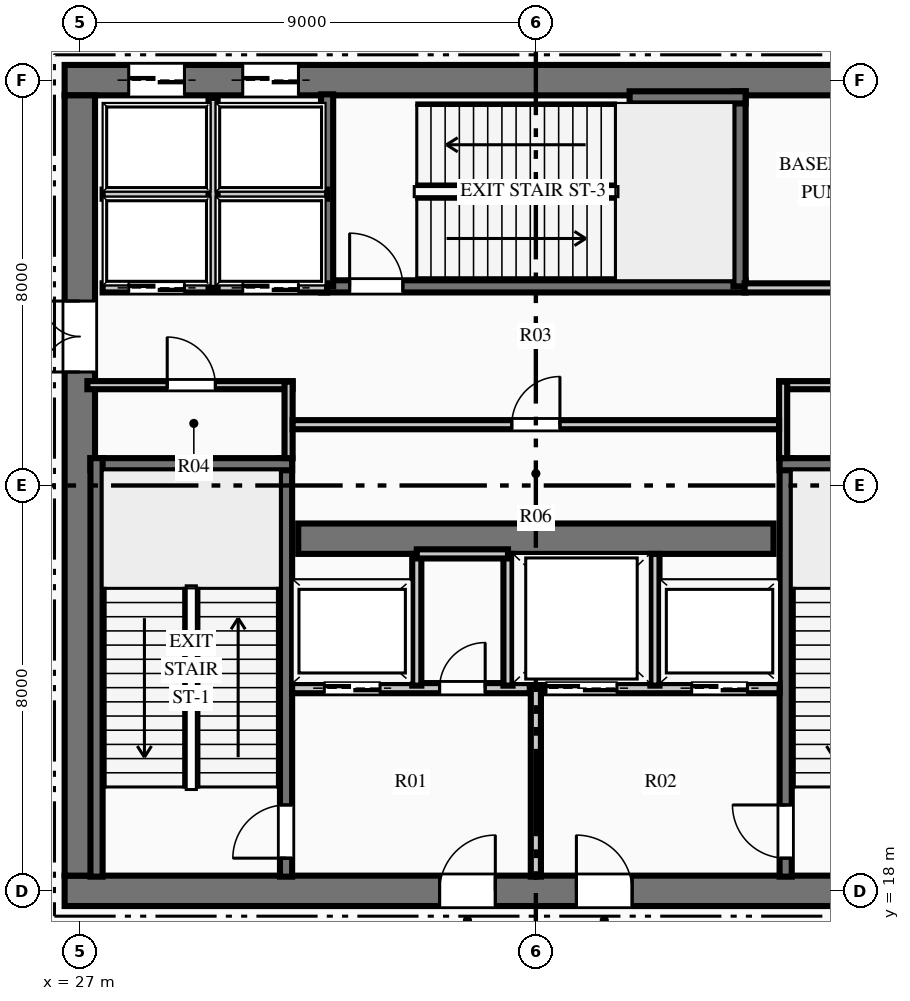
"""IFC4 building model, lengths in metres.
Left out: names, types, materials, properties, quantities, classifications, styles, units other than length and angle.
Written with IfcOpenShell. Run it as: python <this file> out.ifc"""

import sys

from ifc_helpers import new_model, si_unit, direction, frame, frame_2d, origin, place, context, subcontext, project, spatial, rectangle, extrude, element, fill, save


model = new_model("IFC4")
c1 = context("Model", 3, precision=1e-05, world=origin(), true_north=direction((0.0, 1.0)))
c2 = subcontext(c1, "Body", "Model", "MODEL_VIEW")
j1 = project(units=[si_unit("LENGTHUNIT", "METRE"), si_unit("PLANEANGLEUNIT", "RADIAN")], contexts=[c1])
p1 = place(None, origin())
s1 = spatial("IfcSite", under=j1, at=p1, CompositionType="ELEMENT")
p2 = place(p1, origin())
s2 = spatial("IfcBuilding", under=s1, at=p2, CompositionType="ELEMENT")
p3 = place(p2, frame((0.0, 0.0, -5.2)))
s3 = spatial("IfcBuildingStorey", under=s2, at=p3, CompositionType="ELEMENT", Elevation=-5.2)
p4 = place(p3, frame((26.7, 18.0, -0.3), z_axis=(0.0, 0.0, 1.0), x_axis=(1.0, 0.0, 0.0)))
e1 = element("IfcWall", 1, at=p4, inside=s3, PredefinedType="SHEAR", context=c2, shape_type="SweptSolid", body=[
    extrude(rectangle(XDim=18.6, YDim=0.6, at=frame_2d((9.3, 0.0))), origin(), (0.0, 0.0, 1.0), 5.5),
])
p5 = place(p4, frame((7.4, 0.0, 0.3)))
e2 = element("IfcOpeningElement", 2, at=p5, cuts=e1, PredefinedType="OPENING", context=c2, shape_type="SweptSolid", body=[
    extrude(rectangle(XDim=1.1, YDim=2.15, at=frame_2d((0.55, 1.075))), frame((0.0, 0.31, 0.0), z_axis=(0.0, -1.0, 0.0), x_axis=(1.0, 0.0, 0.0)), (0.0, 0.0, 1.0), 0.62),
])
p6 = place(p4, frame((10.1, 0.0, 0.3)))
e3 = element("IfcOpeningElement", 3, at=p6, cuts=e1, PredefinedType="OPENING", context=c2, shape_type="SweptSolid", body=[
    extrude(rectangle(XDim=1.1, YDim=2.15, at=frame_2d((0.55, 1.075))), frame((0.0, 0.31, 0.0), z_axis=(0.0, -1.0, 0.0), x_axis=(1.0, 0.0, 0.0)), (0.0, 0.0, 1.0), 0.62),
])
p7 = place(p3, frame((26.7, 34.0, -0.3), z_axis=(0.0, 0.0, 1.0), x_axis=(1.0, 0.0, 0.0)))
e4 = element("IfcWall", 4, at=p7, inside=s3, PredefinedType="SHEAR", context=c2, shape_type="SweptSolid", body=[
    extrude(rectangle(XDim=18.6, YDim=0.6, at=frame_2d((9.3, 0.0))), origin(), (0.0, 0.0, 1.0), 5.5),
])
p8 = place(p7, frame((1.265, 0.0, 0.3)))
e5 = element("IfcOpeningElement", 5, at=p8, cuts=e4, PredefinedType="OPENING", context=c2, shape_type="SweptSolid", body=[
    extrude(rectangle(XDim=1.1, YDim=2.15, at=frame_2d((0.55, 1.075))), frame((0.0, 0.31, 0.0), z_axis=(0.0, -1.0, 0.0), x_axis=(1.0, 0.0, 0.0)), (0.0, 0.0, 1.0), 0.62),
])
p9 = place(p7, frame((3.515, 0.0, 0.3)))
e6 = element("IfcOpeningElement", 6, at=p9, cuts=e4, PredefinedType="OPENING", context=c2, shape_type="SweptSolid", body=[
    extrude(rectangle(XDim=1.1, YDim=2.15, at=frame_2d((0.55, 1.075))), frame((0.0, 0.31, 0.0), z_axis=(0.0, -1.0, 0.0), x_axis=(1.0, 0.0, 0.0)), (0.0, 0.0, 1.0), 0.62),
])
p10 = place(p3, frame((27.0, 18.3, -0.3), z_axis=(0.0, 0.0, 1.0), x_axis=(0.0, 1.0, 0.0)))
e7 = element("IfcWall", 7, at=p10, inside=s3, PredefinedType="SHEAR", context=c2, shape_type="SweptSolid", body=[
    extrude(rectangle(XDim=15.4, YDim=0.6, at=frame_2d((7.7, 0.0))), origin(), (0.0, 0.0, 1.0), 5.5),
])
p11 = place(p10, frame((9.94, 0.0, 0.3)))
e8 = element("IfcOpeningElement", 8, at=p11, cuts=e7, PredefinedType="OPENING", context=c2, shape_type="SweptSolid", body=[
    extrude(rectangle(XDim=1.4, YDim=2.2, at=frame_2d((0.7, 1.1))), frame((0.0, 0.31, 0.0), z_axis=(0.0, -1.0, 0.0), x_axis=(1.0, 0.0, 0.0)), (0.0, 0.0, 1.0), 0.62),
])
p12 = place(p3, frame((31.31, 24.95, -0.3), z_axis=(0.0, 0.0, 1.0), x_axis=(1.0, 0.0, 0.0)))
e9 = element("IfcWall", 9, at=p12, inside=s3, PredefinedType="SHEAR", context=c2, shape_type="SweptSolid", body=[
    extrude(rectangle(XDim=9.38, YDim=0.6, at=frame_2d((4.69, 0.0))), origin(), (0.0, 0.0, 1.0), 5.5),
])
p13 = place(p3, frame((31.07, 18.28, -0.3), z_axis=(0.0, 0.0, 1.0), x_axis=(0.0, 1.0, 0.0)))
e10 = element("IfcWall", 10, at=p13, inside=s3, PredefinedType="SHEAR", context=c2, shape_type="SweptSolid", body=[
    extrude(rectangle(XDim=8.26, YDim=0.24, at=frame_2d((4.13, 0.0))), origin(), (0.0, 0.0, 1.0), 5.5),
])
p14 = place(p13, frame((0.365, 0.0, 0.3)))
e11 = element("IfcOpeningElement", 11, at=p14, cuts=e10, PredefinedType="OPENING", context=c2, shape_type="SweptSolid", body=[
    extrude(rectangle(XDim=1.05, YDim=2.15, at=frame_2d((0.525, 1.075))), frame((0.0, 0.13, 0.0), z_axis=(0.0, -1.0, 0.0), x_axis=(1.0, 0.0, 0.0)), (0.0, 0.0, 1.0), 0.26),
])
p15 = place(p3, frame((27.21, 26.42, -0.3), z_axis=(0.0, 0.0, 1.0), x_axis=(1.0, 0.0, 0.0)))
e12 = element("IfcWall", 12, at=p15, inside=s3, PredefinedType="SHEAR", context=c2, shape_type="SweptSolid", body=[
    extrude(rectangle(XDim=3.98, YDim=0.24, at=frame_2d((1.99, 0.0))), origin(), (0.0, 0.0, 1.0), 5.5),
])
p16 = place(p3, frame((27.33, 18.28, -0.3), z_axis=(0.0, 0.0, 1.0), x_axis=(0.0, 1.0, 0.0)))
e13 = element("IfcWall", 13, at=p16, inside=s3, PredefinedType="SHEAR", context=c2, shape_type="SweptSolid", body=[
    extrude(rectangle(XDim=8.26, YDim=0.24, at=frame_2d((4.13, 0.0))), origin(), (0.0, 0.0, 1.0), 5.5),
])
p17 = place(p3, frame((40.93, 18.28, -0.3), z_axis=(0.0, 0.0, 1.0), x_axis=(0.0, 1.0, 0.0)))
e14 = element("IfcWall", 14, at=p17, inside=s3, PredefinedType="SHEAR", context=c2, shape_type="SweptSolid", body=[
    extrude(rectangle(XDim=8.26, YDim=0.24, at=frame_2d((4.13, 0.0))), origin(), (0.0, 0.0, 1.0), 5.5),
])
p18 = place(p17, frame((0.365, 0.0, 0.3)))
e15 = element("IfcOpeningElement", 15, at=p18, cuts=e14, PredefinedType="OPENING", context=c2, shape_type="SweptSolid", body=[
    extrude(rectangle(XDim=1.05, YDim=2.15, at=frame_2d((0.525, 1.075))), frame((0.0, 0.13, 0.0), z_axis=(0.0, -1.0, 0.0), x_axis=(1.0, 0.0, 0.0)), (0.0, 0.0, 1.0), 0.26),
])
p19 = place(p3, frame((40.81, 26.42, -0.3), z_axis=(0.0, 0.0, 1.0), x_axis=(1.0, 0.0, 0.0)))
e16 = element("IfcWall", 16, at=p19, inside=s3, PredefinedType="SHEAR", context=c2, shape_type="SweptSolid", body=[
    extrude(rectangle(XDim=3.98, YDim=0.24, at=frame_2d((1.99, 0.0))), origin(), (0.0, 0.0, 1.0), 5.5),
])
p20 = place(p3, frame((31.76, 29.93, -0.3), z_axis=(0.0, 0.0, 1.0), x_axis=(1.0, 0.0, 0.0)))
e17 = element("IfcWall", 17, at=p20, inside=s3, PredefinedType="SHEAR", context=c2, shape_type="SweptSolid", body=[
    extrude(rectangle(XDim=8.38, YDim=0.24, at=frame_2d((4.19, 0.0))), origin(), (0.0, 0.0, 1.0), 5.5),
])
p21 = place(p20, frame((0.565, 0.0, 0.3)))
e18 = element("IfcOpeningElement", 18, at=p21, cuts=e17, PredefinedType="OPENING", context=c2, shape_type="SweptSolid", body=[
    extrude(rectangle(XDim=1.05, YDim=2.15, at=frame_2d((0.525, 1.075))), frame((0.0, 0.13, 0.0), z_axis=(0.0, -1.0, 0.0), x_axis=(1.0, 0.0, 0.0)), (0.0, 0.0, 1.0), 0.26),
])
p22 = place(p3, frame((31.88, 29.93, -0.3), z_axis=(0.0, 0.0, 1.0), x_axis=(0.0, 1.0, 0.0)))
e19 = element("IfcWall", 19, at=p22, inside=s3, PredefinedType="SHEAR", context=c2, shape_type="SweptSolid", body=[
    extrude(rectangle(XDim=3.79, YDim=0.24, at=frame_2d((1.895, 0.0))), origin(), (0.0, 0.0, 1.0), 5.5),
])
p23 = place(p3, frame((40.02, 29.93, -0.3), z_axis=(0.0, 0.0, 1.0), x_axis=(0.0, 1.0, 0.0)))
e20 = element("IfcWall", 20, at=p23, inside=s3, PredefinedType="SHEAR", context=c2, shape_type="SweptSolid", body=[
    extrude(rectangle(XDim=3.85, YDim=0.24, at=frame_2d((1.925, 0.0))), origin(), (0.0, 0.0, 1.0), 5.5),
])
p24 = place(p3, frame((37.85, 33.66, -0.3), z_axis=(0.0, 0.0, 1.0), x_axis=(1.0, 0.0, 0.0)))
e21 = element("IfcWall", 21, at=p24, inside=s3, PredefinedType="SHEAR", context=c2, shape_type="SweptSolid", body=[
    extrude(rectangle(XDim=2.29, YDim=0.24, at=frame_2d((1.145, 0.0))), origin(), (0.0, 0.0, 1.0), 5.5),
])
p25 = place(p3, frame((36.0, 18.28, 0.0), z_axis=(0.0, 0.0, 1.0), x_axis=(0.0, 1.0, 0.0)))
e22 = element("IfcWall", 22, at=p25, inside=s3, PredefinedType="PARTITIONING", context=c2, shape_type="SweptSolid", body=[
    extrude(rectangle(XDim=3.77, YDim=0.2, at=frame_2d((1.885, 0.0))), origin(), (0.0, 0.0, 1.0), 4.84),
])
p26 = place(p3, frame((31.19, 22.0, 0.0), z_axis=(0.0, 0.0, 1.0), x_axis=(1.0, 0.0, 0.0)))
e23 = element("IfcWall", 23, at=p26, inside=s3, PredefinedType="PARTITIONING", context=c2, shape_type="SweptSolid", body=[
    extrude(rectangle(XDim=4.69, YDim=0.2, at=frame_2d((2.345, 0.0))), origin(), (0.0, 0.0, 1.0), 4.84),
])
p27 = place(p26, frame((2.91, 0.0, 0.0)))
e24 = element("IfcOpeningElement", 24, at=p27, cuts=e23, PredefinedType="OPENING", context=c2, shape_type="SweptSolid", body=[
    extrude(rectangle(XDim=0.9, YDim=2.15, at=frame_2d((0.45, 1.075))), frame((0.0, 0.11, 0.0), z_axis=(0.0, -1.0, 0.0), x_axis=(1.0, 0.0, 0.0)), (0.0, 0.0, 1.0), 0.22),
])
p28 = place(p26, frame((0.635, 0.0, 0.0)))
e25 = element("IfcOpeningElement", 25, at=p28, cuts=e23, PredefinedType="OPENING", context=c2, shape_type="SweptSolid", body=[
    extrude(rectangle(XDim=1.1, YDim=2.15, at=frame_2d((0.55, 1.075))), frame((0.0, 0.11, 0.0), z_axis=(0.0, -1.0, 0.0), x_axis=(1.0, 0.0, 0.0)), (0.0, 0.0, 1.0), 0.22),
])
p29 = place(p3, frame((36.12, 22.0, 0.0), z_axis=(0.0, 0.0, 1.0), x_axis=(1.0, 0.0, 0.0)))
e26 = element("IfcWall", 26, at=p29, inside=s3, PredefinedType="PARTITIONING", context=c2, shape_type="SweptSolid", body=[
    extrude(rectangle(XDim=4.69, YDim=0.2, at=frame_2d((2.345, 0.0))), origin(), (0.0, 0.0, 1.0), 4.84),
])
p30 = place(p29, frame((2.955, 0.0, 0.0)))
e27 = element("IfcOpeningElement", 27, at=p30, cuts=e26, PredefinedType="OPENING", context=c2, shape_type="SweptSolid", body=[
    extrude(rectangle(XDim=1.1, YDim=2.15, at=frame_2d((0.55, 1.075))), frame((0.0, 0.11, 0.0), z_axis=(0.0, -1.0, 0.0), x_axis=(1.0, 0.0, 0.0)), (0.0, 0.0, 1.0), 0.22),
])
p31 = place(p29, frame((0.08, 0.0, 0.0)))
e28 = element("IfcOpeningElement", 28, at=p31, cuts=e26, PredefinedType="OPENING", context=c2, shape_type="SweptSolid", body=[
    extrude(rectangle(XDim=1.4, YDim=2.2, at=frame_2d((0.7, 1.1))), frame((0.0, 0.11, 0.0), z_axis=(0.0, -1.0, 0.0), x_axis=(1.0, 0.0, 0.0)), (0.0, 0.0, 1.0), 0.22),
])
for number, where, z_axis, x_axis in (
    (29, (33.65, 22.05, 0.0), (0.0, 0.0, 1.0), (0.0, 1.0, 0.0)),
    (30, (35.45, 22.05, 0.0), (0.0, 0.0, 1.0), (0.0, 1.0, 0.0)),
):
    element("IfcWall", number, at=place(p3, frame(where, z_axis=z_axis, x_axis=x_axis)), inside=s3, PredefinedType="PARTITIONING", context=c2, shape_type="SweptSolid", body=[
        extrude(rectangle(XDim=2.6, YDim=0.18, at=frame_2d((1.3, 0.0))), origin(), (0.0, 0.0, 1.0), 4.84),
    ])
p32 = place(p3, frame((33.65, 24.65, 0.0), z_axis=(0.0, 0.0, 1.0), x_axis=(1.0, 0.0, 0.0)))
e31 = element("IfcWall", 31, at=p32, inside=s3, PredefinedType="PARTITIONING", context=c2, shape_type="SweptSolid", body=[
    extrude(rectangle(XDim=1.8, YDim=0.18, at=frame_2d((0.9, 0.0))), origin(), (0.0, 0.0, 1.0), 4.84),
])
p33 = place(p3, frame((38.35, 22.05, 0.0), z_axis=(0.0, 0.0, 1.0), x_axis=(0.0, 1.0, 0.0)))
e32 = element("IfcWall", 32, at=p33, inside=s3, PredefinedType="PARTITIONING", context=c2, shape_type="SweptSolid", body=[
    extrude(rectangle(XDim=2.6, YDim=0.18, at=frame_2d((1.3, 0.0))), origin(), (0.0, 0.0, 1.0), 4.84),
])
p34 = place(p3, frame((27.15, 27.98, 0.0), z_axis=(0.0, 0.0, 1.0), x_axis=(1.0, 0.0, 0.0)))
e33 = element("IfcWall", 33, at=p34, inside=s3, PredefinedType="PARTITIONING", context=c2, shape_type="SweptSolid", body=[
    extrude(rectangle(XDim=4.05, YDim=0.16, at=frame_2d((2.025, 0.0))), origin(), (0.0, 0.0, 1.0), 4.84),
])
p35 = place(p34, frame((1.575, 0.0, 0.0)))
e34 = element("IfcOpeningElement", 34, at=p35, cuts=e33, PredefinedType="OPENING", context=c2, shape_type="SweptSolid", body=[
    extrude(rectangle(XDim=0.95, YDim=2.15, at=frame_2d((0.475, 1.075))), frame((0.0, 0.09, 0.0), z_axis=(0.0, -1.0, 0.0), x_axis=(1.0, 0.0, 0.0)), (0.0, 0.0, 1.0), 0.18),
])
p36 = place(p3, frame((31.12, 26.54, 0.0), z_axis=(0.0, 0.0, 1.0), x_axis=(0.0, 1.0, 0.0)))
e35 = element("IfcWall", 35, at=p36, inside=s3, PredefinedType="PARTITIONING", context=c2, shape_type="SweptSolid", body=[
    extrude(rectangle(XDim=1.51, YDim=0.16, at=frame_2d((0.755, 0.0))), origin(), (0.0, 0.0, 1.0), 4.84),
])
p37 = place(p3, frame((40.8, 27.98, 0.0), z_axis=(0.0, 0.0, 1.0), x_axis=(1.0, 0.0, 0.0)))
e36 = element("IfcWall", 36, at=p37, inside=s3, PredefinedType="PARTITIONING", context=c2, shape_type="SweptSolid", body=[
    extrude(rectangle(XDim=4.05, YDim=0.16, at=frame_2d((2.025, 0.0))), origin(), (0.0, 0.0, 1.0), 4.84),
])
p38 = place(p37, frame((1.475, 0.0, 0.0)))
e37 = element("IfcOpeningElement", 37, at=p38, cuts=e36, PredefinedType="OPENING", context=c2, shape_type="SweptSolid", body=[
    extrude(rectangle(XDim=0.95, YDim=2.15, at=frame_2d((0.475, 1.075))), frame((0.0, 0.09, 0.0), z_axis=(0.0, -1.0, 0.0), x_axis=(1.0, 0.0, 0.0)), (0.0, 0.0, 1.0), 0.18),
])
p39 = place(p3, frame((40.88, 26.54, 0.0), z_axis=(0.0, 0.0, 1.0), x_axis=(0.0, 1.0, 0.0)))
e38 = element("IfcWall", 38, at=p39, inside=s3, PredefinedType="PARTITIONING", context=c2, shape_type="SweptSolid", body=[
    extrude(rectangle(XDim=1.51, YDim=0.16, at=frame_2d((0.755, 0.0))), origin(), (0.0, 0.0, 1.0), 4.84),
])
p40 = place(p3, frame((27.45, 29.9, 0.0), z_axis=(0.0, 0.0, 1.0), x_axis=(1.0, 0.0, 0.0)))
e39 = element("IfcWall", 39, at=p40, inside=s3, PredefinedType="PARTITIONING", context=c2, shape_type="SweptSolid", body=[
    extrude(rectangle(XDim=4.43, YDim=0.18, at=frame_2d((2.215, 0.0))), origin(), (0.0, 0.0, 1.0), 4.84),
])
p41 = place(p40, frame((0.515, 0.0, 0.0)))
e40 = element("IfcOpeningElement", 40, at=p41, cuts=e39, PredefinedType="OPENING", context=c2, shape_type="SweptSolid", body=[
    extrude(rectangle(XDim=1.1, YDim=2.15, at=frame_2d((0.55, 1.075))), frame((0.0, 0.1, 0.0), z_axis=(0.0, -1.0, 0.0), x_axis=(1.0, 0.0, 0.0)), (0.0, 0.0, 1.0), 0.2),
])
p42 = place(p40, frame((2.765, 0.0, 0.0)))
e41 = element("IfcOpeningElement", 41, at=p42, cuts=e39, PredefinedType="OPENING", context=c2, shape_type="SweptSolid", body=[
    extrude(rectangle(XDim=1.1, YDim=2.15, at=frame_2d((0.55, 1.075))), frame((0.0, 0.1, 0.0), z_axis=(0.0, -1.0, 0.0), x_axis=(1.0, 0.0, 0.0)), (0.0, 0.0, 1.0), 0.2),
])
p43 = place(p3, frame((27.45, 31.75, 0.0), z_axis=(0.0, 0.0, 1.0), x_axis=(1.0, 0.0, 0.0)))
e42 = element("IfcWall", 42, at=p43, inside=s3, PredefinedType="PARTITIONING", context=c2, shape_type="SweptSolid", body=[
    extrude(rectangle(XDim=4.43, YDim=0.18, at=frame_2d((2.215, 0.0))), origin(), (0.0, 0.0, 1.0), 4.84),
])
p44 = place(p3, frame((29.63, 29.9, 0.0), z_axis=(0.0, 0.0, 1.0), x_axis=(0.0, 1.0, 0.0)))
e43 = element("IfcWall", 43, at=p44, inside=s3, PredefinedType="PARTITIONING", context=c2, shape_type="SweptSolid", body=[
    extrude(rectangle(XDim=3.75, YDim=0.18, at=frame_2d((1.875, 0.0))), origin(), (0.0, 0.0, 1.0), 4.84),
])
p45 = place(p3, frame((40.12, 29.9, 0.0), z_axis=(0.0, 0.0, 1.0), x_axis=(1.0, 0.0, 0.0)))
e44 = element("IfcWall", 44, at=p45, inside=s3, PredefinedType="PARTITIONING", context=c2, shape_type="SweptSolid", body=[
    extrude(rectangle(XDim=4.43, YDim=0.18, at=frame_2d((2.215, 0.0))), origin(), (0.0, 0.0, 1.0), 4.84),
])
p46 = place(p45, frame((1.755, 0.0, 0.0)))
e45 = element("IfcOpeningElement", 45, at=p46, cuts=e44, PredefinedType="OPENING", context=c2, shape_type="SweptSolid", body=[
    extrude(rectangle(XDim=0.95, YDim=2.15, at=frame_2d((0.475, 1.075))), frame((0.0, 0.1, 0.0), z_axis=(0.0, -1.0, 0.0), x_axis=(1.0, 0.0, 0.0)), (0.0, 0.0, 1.0), 0.2),
])
p47 = place(p3, frame((31.2, 27.2, 0.0), z_axis=(0.0, 0.0, 1.0), x_axis=(1.0, 0.0, 0.0)))
e46 = element("IfcWall", 46, at=p47, inside=s3, PredefinedType="PARTITIONING", context=c2, shape_type="SweptSolid", body=[
    extrude(rectangle(XDim=9.6, YDim=0.18, at=frame_2d((4.8, 0.0))), origin(), (0.0, 0.0, 1.0), 4.84),
])
p48 = place(p47, frame((4.325, 0.0, 0.0)))
e47 = element("IfcOpeningElement", 47, at=p48, cuts=e46, PredefinedType="OPENING", context=c2, shape_type="SweptSolid", body=[
    extrude(rectangle(XDim=0.95, YDim=2.15, at=frame_2d((0.475, 1.075))), frame((0.0, 0.1, 0.0), z_axis=(0.0, -1.0, 0.0), x_axis=(1.0, 0.0, 0.0)), (0.0, 0.0, 1.0), 0.2),
])
p49 = place(p35, origin())
e48 = element("IfcDoor", 48, at=p49, inside=s3, OperationType="SINGLE_SWING_LEFT", PredefinedType="DOOR", context=c2, shape_type="SweptSolid", body=[
    extrude(rectangle(XDim=0.95, YDim=2.15, at=frame_2d((0.475, 1.075))), frame((0.0, 0.025, 0.0), z_axis=(0.0, -1.0, 0.0), x_axis=(1.0, 0.0, 0.0)), (0.0, 0.0, 1.0), 0.05),
])
fill(e34, e48)
p50 = place(p48, origin())
e49 = element("IfcDoor", 49, at=p50, inside=s3, OperationType="SINGLE_SWING_RIGHT", PredefinedType="DOOR", context=c2, shape_type="SweptSolid", body=[
    extrude(rectangle(XDim=0.95, YDim=2.15, at=frame_2d((0.475, 1.075))), frame((0.0, 0.025, 0.0), z_axis=(0.0, -1.0, 0.0), x_axis=(1.0, 0.0, 0.0)), (0.0, 0.0, 1.0), 0.05),
])
fill(e47, e49)
p51 = place(p14, origin())
e50 = element("IfcDoor", 50, at=p51, inside=s3, OperationType="SINGLE_SWING_LEFT", PredefinedType="DOOR", context=c2, shape_type="SweptSolid", body=[
    extrude(rectangle(XDim=1.05, YDim=2.15, at=frame_2d((0.525, 1.075))), frame((0.0, 0.025, 0.0), z_axis=(0.0, -1.0, 0.0), x_axis=(1.0, 0.0, 0.0)), (0.0, 0.0, 1.0), 0.05),
])
fill(e11, e50)
p52 = place(p18, origin())
e51 = element("IfcDoor", 51, at=p52, inside=s3, OperationType="SINGLE_SWING_RIGHT", PredefinedType="DOOR", context=c2, shape_type="SweptSolid", body=[
    extrude(rectangle(XDim=1.05, YDim=2.15, at=frame_2d((0.525, 1.075))), frame((0.0, 0.025, 0.0), z_axis=(0.0, -1.0, 0.0), x_axis=(1.0, 0.0, 0.0)), (0.0, 0.0, 1.0), 0.05),
])
fill(e15, e51)
p53 = place(p21, origin())
e52 = element("IfcDoor", 52, at=p53, inside=s3, OperationType="SINGLE_SWING_LEFT", PredefinedType="DOOR", context=c2, shape_type="SweptSolid", body=[
    extrude(rectangle(XDim=1.05, YDim=2.15, at=frame_2d((0.525, 1.075))), frame((0.0, 0.025, 0.0), z_axis=(0.0, -1.0, 0.0), x_axis=(1.0, 0.0, 0.0)), (0.0, 0.0, 1.0), 0.05),
])
fill(e18, e52)
p54 = place(p5, origin())
e53 = element("IfcDoor", 53, at=p54, inside=s3, OperationType="SINGLE_SWING_RIGHT", PredefinedType="DOOR", context=c2, shape_type="SweptSolid", body=[
    extrude(rectangle(XDim=1.1, YDim=2.15, at=frame_2d((0.55, 1.075))), frame((0.0, 0.025, 0.0), z_axis=(0.0, -1.0, 0.0), x_axis=(1.0, 0.0, 0.0)), (0.0, 0.0, 1.0), 0.05),
])
fill(e2, e53)
p55 = place(p6, origin())
e54 = element("IfcDoor", 54, at=p55, inside=s3, OperationType="SINGLE_SWING_LEFT", PredefinedType="DOOR", context=c2, shape_type="SweptSolid", body=[
    extrude(rectangle(XDim=1.1, YDim=2.15, at=frame_2d((0.55, 1.075))), frame((0.0, 0.025, 0.0), z_axis=(0.0, -1.0, 0.0), x_axis=(1.0, 0.0, 0.0)), (0.0, 0.0, 1.0), 0.05),
])
fill(e3, e54)
p56 = place(p27, origin())
e55 = element("IfcDoor", 55, at=p56, inside=s3, OperationType="SINGLE_SWING_RIGHT", PredefinedType="DOOR", context=c2, shape_type="SweptSolid", body=[
    extrude(rectangle(XDim=0.9, YDim=2.15, at=frame_2d((0.45, 1.075))), frame((0.0, 0.025, 0.0), z_axis=(0.0, -1.0, 0.0), x_axis=(1.0, 0.0, 0.0)), (0.0, 0.0, 1.0), 0.05),
])
fill(e24, e55)
p57 = place(p11, origin())
e56 = element("IfcDoor", 56, at=p57, inside=s3, OperationType="DOUBLE_DOOR_SINGLE_SWING", PredefinedType="DOOR", context=c2, shape_type="SweptSolid", body=[
    extrude(rectangle(XDim=1.4, YDim=2.2, at=frame_2d((0.7, 1.1))), frame((0.0, 0.025, 0.0), z_axis=(0.0, -1.0, 0.0), x_axis=(1.0, 0.0, 0.0)), (0.0, 0.0, 1.0), 0.05),
])
fill(e8, e56)
p58 = place(p41, origin())
e57 = element("IfcDoor", 57, at=p58, inside=s3, OperationType="SLIDING_TO_LEFT", PredefinedType="DOOR", context=c2, shape_type="SweptSolid", body=[
    extrude(rectangle(XDim=1.1, YDim=2.15, at=frame_2d((0.55, 1.075))), frame((0.0, 0.025, 0.0), z_axis=(0.0, -1.0, 0.0), x_axis=(1.0, 0.0, 0.0)), (0.0, 0.0, 1.0), 0.05),
])
fill(e40, e57)
p59 = place(p42, origin())
e58 = element("IfcDoor", 58, at=p59, inside=s3, OperationType="SLIDING_TO_LEFT", PredefinedType="DOOR", context=c2, shape_type="SweptSolid", body=[
    extrude(rectangle(XDim=1.1, YDim=2.15, at=frame_2d((0.55, 1.075))), frame((0.0, 0.025, 0.0), z_axis=(0.0, -1.0, 0.0), x_axis=(1.0, 0.0, 0.0)), (0.0, 0.0, 1.0), 0.05),
])
fill(e41, e58)
p60 = place(p8, origin())
e59 = element("IfcDoor", 59, at=p60, inside=s3, OperationType="SLIDING_TO_LEFT", PredefinedType="DOOR", context=c2, shape_type="SweptSolid", body=[
    extrude(rectangle(XDim=1.1, YDim=2.15, at=frame_2d((0.55, 1.075))), frame((0.0, 0.025, 0.0), z_axis=(0.0, -1.0, 0.0), x_axis=(1.0, 0.0, 0.0)), (0.0, 0.0, 1.0), 0.05),
])
fill(e5, e59)
p61 = place(p9, origin())
e60 = element("IfcDoor", 60, at=p61, inside=s3, OperationType="SLIDING_TO_LEFT", PredefinedType="DOOR", context=c2, shape_type="SweptSolid", body=[
    extrude(rectangle(XDim=1.1, YDim=2.15, at=frame_2d((0.55, 1.075))), frame((0.0, 0.025, 0.0), z_axis=(0.0, -1.0, 0.0), x_axis=(1.0, 0.0, 0.0)), (0.0, 0.0, 1.0), 0.05),
])
fill(e6, e60)
p62 = place(p28, origin())
e61 = element("IfcDoor", 61, at=p62, inside=s3, OperationType="SLIDING_TO_LEFT", PredefinedType="DOOR", context=c2, shape_type="SweptSolid", body=[
    extrude(rectangle(XDim=1.1, YDim=2.15, at=frame_2d((0.55, 1.075))), frame((0.0, 0.025, 0.0), z_axis=(0.0, -1.0, 0.0), x_axis=(1.0, 0.0, 0.0)), (0.0, 0.0, 1.0), 0.05),
])
fill(e25, e61)
p63 = place(p30, origin())
e62 = element("IfcDoor", 62, at=p63, inside=s3, OperationType="SLIDING_TO_LEFT", PredefinedType="DOOR", context=c2, shape_type="SweptSolid", body=[
    extrude(rectangle(XDim=1.1, YDim=2.15, at=frame_2d((0.55, 1.075))), frame((0.0, 0.025, 0.0), z_axis=(0.0, -1.0, 0.0), x_axis=(1.0, 0.0, 0.0)), (0.0, 0.0, 1.0), 0.05),
])
fill(e27, e62)
p64 = place(p31, origin())
e63 = element("IfcDoor", 63, at=p64, inside=s3, OperationType="SLIDING_TO_LEFT", PredefinedType="DOOR", context=c2, shape_type="SweptSolid", body=[
    extrude(rectangle(XDim=1.4, YDim=2.2, at=frame_2d((0.7, 1.1))), frame((0.0, 0.025, 0.0), z_axis=(0.0, -1.0, 0.0), x_axis=(1.0, 0.0, 0.0)), (0.0, 0.0, 1.0), 0.05),
])
fill(e28, e63)
save(model, sys.argv[1])
